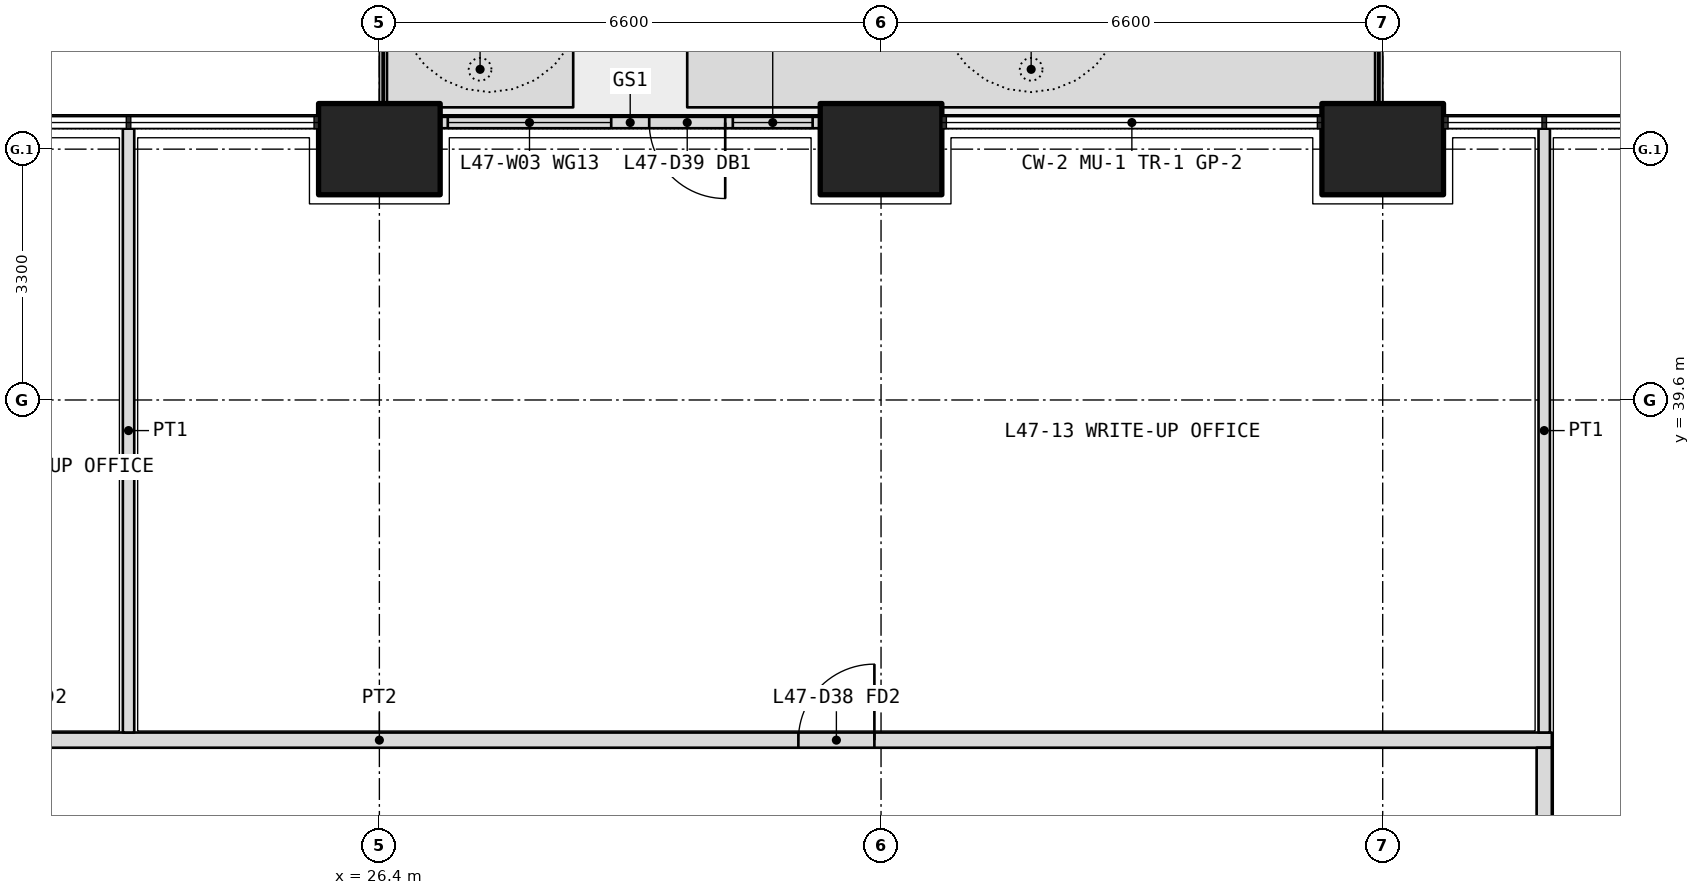
"""IFC4 building model, lengths in metres.
Left out: names, types, materials, properties, quantities, classifications, styles, units other than length and angle.
Written with IfcOpenShell. Run it as: python <this file> out.ifc"""

import sys

from ifc_helpers import new_model, si_unit, direction, frame, frame_2d, origin, origin_2d, place, context, subcontext, project, spatial, polyline, rectangle, outline, extrude, element, fill, save


model = new_model("IFC4")
c1 = context("Model", 3, precision=1e-05, world=origin(), true_north=direction((0.0, 1.0)))
c2 = subcontext(c1, "Body", "Model", "MODEL_VIEW")
j1 = project(units=[si_unit("LENGTHUNIT", "METRE"), si_unit("PLANEANGLEUNIT", "RADIAN")], contexts=[c1])
p1 = place(None, origin())
s1 = spatial("IfcSite", under=j1, at=p1, CompositionType="ELEMENT")
p2 = place(p1, origin())
s2 = spatial("IfcBuilding", under=s1, at=p2, CompositionType="ELEMENT")
p3 = place(p2, frame((0.0, 0.0, 206.1)))
s3 = spatial("IfcBuildingStorey", under=s2, at=p3, CompositionType="ELEMENT", Elevation=206.1)
for number, where, z_axis, x_axis in (
    (1, (26.4, 42.9, 0.0), (0.0, 0.0, 1.0), (1.0, 0.0, 0.0)),
    (2, (33.0, 42.9, 0.0), (0.0, 0.0, 1.0), (1.0, 0.0, 0.0)),
    (3, (39.6, 42.9, 0.0), (0.0, 0.0, 1.0), (1.0, 0.0, 0.0)),
):
    element("IfcColumn", number, at=place(p3, frame(where, z_axis=z_axis, x_axis=x_axis)), inside=s3, PredefinedType="COLUMN", context=c2, shape_type="SweptSolid", body=[
        extrude(rectangle(XDim=1.6, YDim=1.2, at=origin_2d()), origin(), (0.0, 0.0, 1.0), 4.2),
    ])
p4 = place(p3, origin())
e4 = element("IfcWall", 4, at=p4, inside=s3, PredefinedType="USERDEFINED", context=c2, shape_type="SweptSolid", body=[
    extrude(outline(polyline([(26.5, 43.45), (28.95, 43.45), (28.95, 44.45), (26.5, 44.45), (26.5, 43.45)]), holes=[polyline([(26.65, 43.6), (28.8, 43.6), (28.8, 44.3), (26.65, 44.3), (26.65, 43.6)])]), origin(), (0.0, 0.0, 1.0), 1.05),
])
p5 = place(p3, origin())
e5 = element("IfcWall", 5, at=p5, inside=s3, PredefinedType="USERDEFINED", context=c2, shape_type="SweptSolid", body=[
    extrude(outline(polyline([(30.45, 43.45), (39.5, 43.45), (39.5, 44.45), (30.45, 44.45), (30.45, 43.45)]), holes=[polyline([(30.6, 43.6), (39.35, 43.6), (39.35, 44.3), (30.6, 44.3), (30.6, 43.6)])]), origin(), (0.0, 0.0, 1.0), 1.05),
])
p6 = place(p3, frame((32.2, 43.25, 0.0), z_axis=(0.0, 0.0, 1.0), x_axis=(-1.0, 0.0, 0.0)))
e6 = element("IfcWall", 6, at=p6, inside=s3, PredefinedType="SOLIDWALL", context=c2, shape_type="SweptSolid", body=[
    extrude(rectangle(XDim=5.0, YDim=0.15, at=frame_2d((2.5, 0.0))), origin(), (0.0, 0.0, 1.0), 2.7),
])
p7 = place(p6, frame((1.25, 0.0, 0.0)))
e7 = element("IfcOpeningElement", 7, at=p7, cuts=e6, PredefinedType="OPENING", context=c2, shape_type="SweptSolid", body=[
    extrude(rectangle(XDim=1.0, YDim=2.4, at=frame_2d((0.5, 1.2))), frame((0.0, 0.085, 0.0), z_axis=(0.0, -1.0, 0.0), x_axis=(1.0, 0.0, 0.0)), (0.0, 0.0, 1.0), 0.17),
])
p8 = place(p6, frame((0.1, 0.0, 0.1)))
e8 = element("IfcOpeningElement", 8, at=p8, cuts=e6, PredefinedType="OPENING", context=c2, shape_type="SweptSolid", body=[
    extrude(rectangle(XDim=1.05, YDim=2.3, at=frame_2d((0.525, 1.15))), frame((0.0, 0.085, 0.0), z_axis=(0.0, -1.0, 0.0), x_axis=(1.0, 0.0, 0.0)), (0.0, 0.0, 1.0), 0.17),
])
p9 = place(p6, frame((2.75, 0.0, 0.1)))
e9 = element("IfcOpeningElement", 9, at=p9, cuts=e6, PredefinedType="OPENING", context=c2, shape_type="SweptSolid", body=[
    extrude(rectangle(XDim=2.15, YDim=2.3, at=frame_2d((1.075, 1.15))), frame((0.0, 0.085, 0.0), z_axis=(0.0, -1.0, 0.0), x_axis=(1.0, 0.0, 0.0)), (0.0, 0.0, 1.0), 0.17),
])
p10 = place(p3, frame((10.975, 35.125, 0.0), z_axis=(0.0, 0.0, 1.0), x_axis=(1.0, 0.0, 0.0)))
e10 = element("IfcWall", 10, at=p10, inside=s3, PredefinedType="PARTITIONING", context=c2, shape_type="SweptSolid", body=[
    extrude(rectangle(XDim=30.85, YDim=0.2, at=frame_2d((15.425, 0.0))), origin(), (0.0, 0.0, 1.0), 2.85),
])
p11 = place(p10, frame((0.562, 0.0, 0.0)))
e11 = element("IfcOpeningElement", 11, at=p11, cuts=e10, PredefinedType="OPENING", context=c2, shape_type="SweptSolid", body=[
    extrude(rectangle(XDim=1.2, YDim=2.1, at=frame_2d((0.6, 1.05))), frame((0.0, 0.11, 0.0), z_axis=(0.0, -1.0, 0.0), x_axis=(1.0, 0.0, 0.0)), (0.0, 0.0, 1.0), 0.22),
])
p12 = place(p10, frame((3.825, 0.0, 0.0)))
e12 = element("IfcOpeningElement", 12, at=p12, cuts=e10, PredefinedType="OPENING", context=c2, shape_type="SweptSolid", body=[
    extrude(rectangle(XDim=1.0, YDim=2.1, at=frame_2d((0.5, 1.05))), frame((0.0, 0.11, 0.0), z_axis=(0.0, -1.0, 0.0), x_axis=(1.0, 0.0, 0.0)), (0.0, 0.0, 1.0), 0.22),
])
p13 = place(p10, frame((7.125, 0.0, 0.0)))
e13 = element("IfcOpeningElement", 13, at=p13, cuts=e10, PredefinedType="OPENING", context=c2, shape_type="SweptSolid", body=[
    extrude(rectangle(XDim=1.0, YDim=2.1, at=frame_2d((0.5, 1.05))), frame((0.0, 0.11, 0.0), z_axis=(0.0, -1.0, 0.0), x_axis=(1.0, 0.0, 0.0)), (0.0, 0.0, 1.0), 0.22),
])
p14 = place(p10, frame((9.975, 0.0, 0.0)))
e14 = element("IfcOpeningElement", 14, at=p14, cuts=e10, PredefinedType="OPENING", context=c2, shape_type="SweptSolid", body=[
    extrude(rectangle(XDim=1.0, YDim=2.1, at=frame_2d((0.5, 1.05))), frame((0.0, 0.11, 0.0), z_axis=(0.0, -1.0, 0.0), x_axis=(1.0, 0.0, 0.0)), (0.0, 0.0, 1.0), 0.22),
])
p15 = place(p10, frame((20.938, 0.0, 0.0)))
e15 = element("IfcOpeningElement", 15, at=p15, cuts=e10, PredefinedType="OPENING", context=c2, shape_type="SweptSolid", body=[
    extrude(rectangle(XDim=1.0, YDim=2.1, at=frame_2d((0.5, 1.05))), frame((0.0, 0.11, 0.0), z_axis=(0.0, -1.0, 0.0), x_axis=(1.0, 0.0, 0.0)), (0.0, 0.0, 1.0), 0.22),
])
p16 = place(p3, frame((41.725, 11.175, 0.0), z_axis=(0.0, 0.0, 1.0), x_axis=(0.0, 1.0, 0.0)))
e16 = element("IfcWall", 16, at=p16, inside=s3, PredefinedType="PARTITIONING", context=c2, shape_type="SweptSolid", body=[
    extrude(rectangle(XDim=23.85, YDim=0.2, at=frame_2d((11.925, 0.0))), origin(), (0.0, 0.0, 1.0), 2.85),
])
p17 = place(p16, frame((3.762, 0.0, 0.0)))
e17 = element("IfcOpeningElement", 17, at=p17, cuts=e16, PredefinedType="OPENING", context=c2, shape_type="SweptSolid", body=[
    extrude(rectangle(XDim=1.0, YDim=2.1, at=frame_2d((0.5, 1.05))), frame((0.0, 0.11, 0.0), z_axis=(0.0, -1.0, 0.0), x_axis=(1.0, 0.0, 0.0)), (0.0, 0.0, 1.0), 0.22),
])
p18 = place(p16, frame((9.625, 0.0, 0.0)))
e18 = element("IfcOpeningElement", 18, at=p18, cuts=e16, PredefinedType="OPENING", context=c2, shape_type="SweptSolid", body=[
    extrude(rectangle(XDim=1.0, YDim=2.1, at=frame_2d((0.5, 1.05))), frame((0.0, 0.11, 0.0), z_axis=(0.0, -1.0, 0.0), x_axis=(1.0, 0.0, 0.0)), (0.0, 0.0, 1.0), 0.22),
])
p19 = place(p16, frame((12.975, 0.0, 0.0)))
e19 = element("IfcOpeningElement", 19, at=p19, cuts=e16, PredefinedType="OPENING", context=c2, shape_type="SweptSolid", body=[
    extrude(rectangle(XDim=0.9, YDim=2.1, at=frame_2d((0.45, 1.05))), frame((0.0, 0.11, 0.0), z_axis=(0.0, -1.0, 0.0), x_axis=(1.0, 0.0, 0.0)), (0.0, 0.0, 1.0), 0.22),
])
p20 = place(p16, frame((16.275, 0.0, 0.0)))
e20 = element("IfcOpeningElement", 20, at=p20, cuts=e16, PredefinedType="OPENING", context=c2, shape_type="SweptSolid", body=[
    extrude(rectangle(XDim=1.2, YDim=2.1, at=frame_2d((0.6, 1.05))), frame((0.0, 0.11, 0.0), z_axis=(0.0, -1.0, 0.0), x_axis=(1.0, 0.0, 0.0)), (0.0, 0.0, 1.0), 0.22),
])
p21 = place(p16, frame((20.738, 0.0, 0.0)))
e21 = element("IfcOpeningElement", 21, at=p21, cuts=e16, PredefinedType="OPENING", context=c2, shape_type="SweptSolid", body=[
    extrude(rectangle(XDim=1.0, YDim=2.1, at=frame_2d((0.5, 1.05))), frame((0.0, 0.11, 0.0), z_axis=(0.0, -1.0, 0.0), x_axis=(1.0, 0.0, 0.0)), (0.0, 0.0, 1.0), 0.22),
])
for number, where, z_axis, x_axis in (
    (22, (41.725, 43.17, 0.0), (0.0, 0.0, 1.0), (0.0, -1.0, 0.0)),
    (23, (23.1, 43.17, 0.0), (0.0, 0.0, 1.0), (0.0, -1.0, 0.0)),
):
    element("IfcWall", number, at=place(p3, frame(where, z_axis=z_axis, x_axis=x_axis)), inside=s3, PredefinedType="PARTITIONING", context=c2, shape_type="SweptSolid", body=[
        extrude(rectangle(XDim=7.945, YDim=0.15, at=frame_2d((3.972, 0.0))), origin(), (0.0, 0.0, 1.0), 2.7),
    ])
p22 = place(p7, origin())
e24 = element("IfcDoor", 24, at=p22, inside=s3, OperationType="SINGLE_SWING_LEFT", PredefinedType="DOOR", context=c2, shape_type="SweptSolid", body=[
    extrude(rectangle(XDim=1.0, YDim=2.4, at=frame_2d((0.5, 1.2))), frame((0.0, 0.025, 0.0), z_axis=(0.0, -1.0, 0.0), x_axis=(1.0, 0.0, 0.0)), (0.0, 0.0, 1.0), 0.05),
])
fill(e7, e24)
p23 = place(p8, origin())
e25 = element("IfcWindow", 25, at=p23, inside=s3, PartitioningType="SINGLE_PANEL", PredefinedType="WINDOW", context=c2, shape_type="SweptSolid", body=[
    extrude(rectangle(XDim=1.05, YDim=2.3, at=frame_2d((0.525, 1.15))), frame((0.0, 0.03, 0.0), z_axis=(0.0, -1.0, 0.0), x_axis=(1.0, 0.0, 0.0)), (0.0, 0.0, 1.0), 0.06),
])
fill(e8, e25)
p24 = place(p9, origin())
e26 = element("IfcWindow", 26, at=p24, inside=s3, PartitioningType="SINGLE_PANEL", PredefinedType="WINDOW", context=c2, shape_type="SweptSolid", body=[
    extrude(rectangle(XDim=2.15, YDim=2.3, at=frame_2d((1.075, 1.15))), frame((0.0, 0.03, 0.0), z_axis=(0.0, -1.0, 0.0), x_axis=(1.0, 0.0, 0.0)), (0.0, 0.0, 1.0), 0.06),
])
fill(e9, e26)
p25 = place(p15, origin())
e27 = element("IfcDoor", 27, at=p25, inside=s3, OperationType="SINGLE_SWING_RIGHT", PredefinedType="DOOR", context=c2, shape_type="SweptSolid", body=[
    extrude(rectangle(XDim=1.0, YDim=2.1, at=frame_2d((0.5, 1.05))), frame((0.0, 0.025, 0.0), z_axis=(0.0, -1.0, 0.0), x_axis=(1.0, 0.0, 0.0)), (0.0, 0.0, 1.0), 0.05),
])
fill(e15, e27)
save(model, sys.argv[1])
